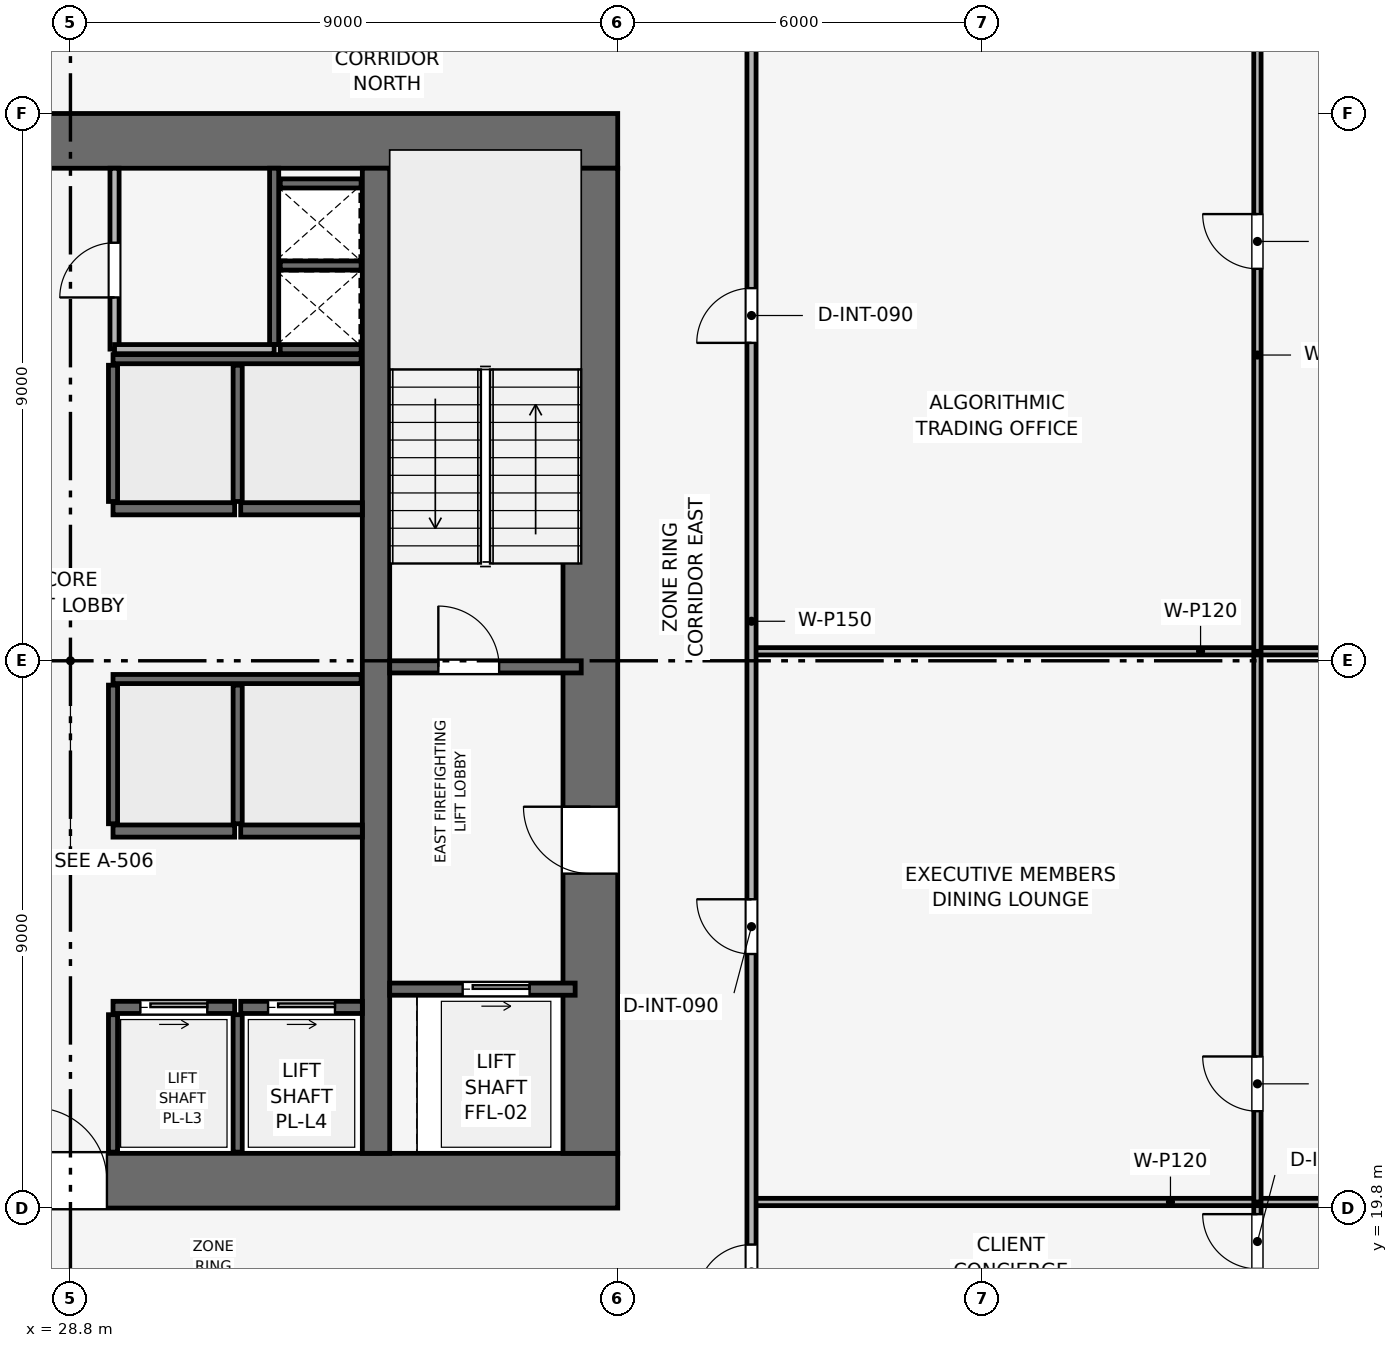
"""IFC4 building model, lengths in metres.
Left out: names, types, materials, properties, quantities, classifications, styles, units other than length and angle.
Written with IfcOpenShell. Run it as: python <this file> out.ifc"""

import sys

from ifc_helpers import new_model, si_unit, direction, frame, frame_2d, origin, place, context, subcontext, project, spatial, rectangle, extrude, element, fill, save


model = new_model("IFC4")
c1 = context("Model", 3, precision=1e-05, world=origin(), true_north=direction((0.0, 1.0)))
c2 = subcontext(c1, "Body", "Model", "MODEL_VIEW")
j1 = project(units=[si_unit("LENGTHUNIT", "METRE"), si_unit("PLANEANGLEUNIT", "RADIAN")], contexts=[c1])
p1 = place(None, origin())
s1 = spatial("IfcSite", under=j1, at=p1, CompositionType="ELEMENT")
p2 = place(p1, origin())
s2 = spatial("IfcBuilding", under=s1, at=p2, CompositionType="ELEMENT")
p3 = place(p2, frame((0.0, 0.0, 121.2)))
s3 = spatial("IfcBuildingStorey", under=s2, at=p3, CompositionType="ELEMENT", Elevation=121.2)
p4 = place(p3, frame((19.8, 20.25, 0.0), z_axis=(0.0, 0.0, 1.0), x_axis=(1.0, 0.0, 0.0)))
e1 = element("IfcWall", 1, at=p4, inside=s3, PredefinedType="SHEAR", context=c2, shape_type="SweptSolid", body=[
    extrude(rectangle(XDim=18.0, YDim=0.9, at=frame_2d((9.0, 0.0))), origin(), (0.0, 0.0, 1.0), 3.9),
])
p5 = place(p4, frame((8.4, 0.0, 0.0)))
e2 = element("IfcOpeningElement", 2, at=p5, cuts=e1, PredefinedType="OPENING", context=c2, shape_type="SweptSolid", body=[
    extrude(rectangle(XDim=1.2, YDim=2.2, at=frame_2d((0.6, 1.1))), frame((0.0, 0.46, 0.0), z_axis=(0.0, -1.0, 0.0), x_axis=(1.0, 0.0, 0.0)), (0.0, 0.0, 1.0), 0.92),
])
p6 = place(p3, frame((19.8, 37.35, 0.0), z_axis=(0.0, 0.0, 1.0), x_axis=(1.0, 0.0, 0.0)))
e3 = element("IfcWall", 3, at=p6, inside=s3, PredefinedType="SHEAR", context=c2, shape_type="SweptSolid", body=[
    extrude(rectangle(XDim=18.0, YDim=0.9, at=frame_2d((9.0, 0.0))), origin(), (0.0, 0.0, 1.0), 3.9),
])
p7 = place(p6, frame((7.05, 0.0, 0.0)))
e4 = element("IfcOpeningElement", 4, at=p7, cuts=e3, PredefinedType="OPENING", context=c2, shape_type="SweptSolid", body=[
    extrude(rectangle(XDim=1.1, YDim=2.15, at=frame_2d((0.55, 1.075))), frame((0.0, 0.46, 0.0), z_axis=(0.0, -1.0, 0.0), x_axis=(1.0, 0.0, 0.0)), (0.0, 0.0, 1.0), 0.92),
])
p8 = place(p3, frame((37.35, 20.7, 0.0), z_axis=(0.0, 0.0, 1.0), x_axis=(0.0, 1.0, 0.0)))
e5 = element("IfcWall", 5, at=p8, inside=s3, PredefinedType="SHEAR", context=c2, shape_type="SweptSolid", body=[
    extrude(rectangle(XDim=16.2, YDim=0.9, at=frame_2d((8.1, 0.0))), origin(), (0.0, 0.0, 1.0), 3.9),
])
p9 = place(p8, frame((4.6, 0.0, 0.0)))
e6 = element("IfcOpeningElement", 6, at=p9, cuts=e5, PredefinedType="OPENING", context=c2, shape_type="SweptSolid", body=[
    extrude(rectangle(XDim=1.1, YDim=2.15, at=frame_2d((0.55, 1.075))), frame((0.0, 0.46, 0.0), z_axis=(0.0, -1.0, 0.0), x_axis=(1.0, 0.0, 0.0)), (0.0, 0.0, 1.0), 0.92),
])
p10 = place(p3, frame((33.825, 20.7, 0.0), z_axis=(0.0, 0.0, 1.0), x_axis=(0.0, 1.0, 0.0)))
e7 = element("IfcWall", 7, at=p10, inside=s3, PredefinedType="SHEAR", context=c2, shape_type="SweptSolid", body=[
    extrude(rectangle(XDim=16.2, YDim=0.45, at=frame_2d((8.1, 0.0))), origin(), (0.0, 0.0, 1.0), 3.9),
])
p11 = place(p3, frame((34.05, 28.7, 0.0), z_axis=(0.0, 0.0, 1.0), x_axis=(1.0, 0.0, 0.0)))
e8 = element("IfcWall", 8, at=p11, inside=s3, PredefinedType="SHEAR", context=c2, shape_type="SweptSolid", body=[
    extrude(rectangle(XDim=3.15, YDim=0.2, at=frame_2d((1.575, 0.0))), origin(), (0.0, 0.0, 1.0), 3.65),
])
p12 = place(p11, frame((0.8, 0.0, 0.0)))
e9 = element("IfcOpeningElement", 9, at=p12, cuts=e8, PredefinedType="OPENING", context=c2, shape_type="SweptSolid", body=[
    extrude(rectangle(XDim=1.0, YDim=2.1, at=frame_2d((0.5, 1.05))), frame((0.0, 0.11, 0.0), z_axis=(0.0, -1.0, 0.0), x_axis=(1.0, 0.0, 0.0)), (0.0, 0.0, 1.0), 0.22),
])
p13 = place(p3, frame((32.15, 34.0, 0.0), z_axis=(0.0, 0.0, 1.0), x_axis=(0.0, 1.0, 0.0)))
e10 = element("IfcWall", 10, at=p13, inside=s3, PredefinedType="SHEAR", context=c2, shape_type="SweptSolid", body=[
    extrude(rectangle(XDim=2.9, YDim=0.15, at=frame_2d((1.45, 0.0))), origin(), (0.0, 0.0, 1.0), 3.65),
])
for number, where, z_axis, x_axis in (
    (11, (32.25, 33.925, 0.0), (0.0, 0.0, 1.0), (1.0, 0.0, 0.0)),
    (12, (32.25, 35.3, 0.0), (0.0, 0.0, 1.0), (1.0, 0.0, 0.0)),
):
    element("IfcWall", number, at=place(p3, frame(where, z_axis=z_axis, x_axis=x_axis)), inside=s3, PredefinedType="SHEAR", context=c2, shape_type="SweptSolid", body=[
        extrude(rectangle(XDim=1.33, YDim=0.15, at=frame_2d((0.665, 0.0))), origin(), (0.0, 0.0, 1.0), 3.65),
    ])
p14 = place(p3, frame((34.05, 23.4, 0.0), z_axis=(0.0, 0.0, 1.0), x_axis=(1.0, 0.0, 0.0)))
e13 = element("IfcWall", 13, at=p14, inside=s3, PredefinedType="SHEAR", context=c2, shape_type="SweptSolid", body=[
    extrude(rectangle(XDim=3.05, YDim=0.2, at=frame_2d((1.525, 0.0))), origin(), (0.0, 0.0, 1.0), 3.65),
])
p15 = place(p14, frame((1.2, 0.0, 0.0)))
e14 = element("IfcOpeningElement", 14, at=p15, cuts=e13, PredefinedType="OPENING", context=c2, shape_type="SweptSolid", body=[
    extrude(rectangle(XDim=1.1, YDim=2.15, at=frame_2d((0.55, 1.075))), frame((0.0, 0.11, 0.0), z_axis=(0.0, -1.0, 0.0), x_axis=(1.0, 0.0, 0.0)), (0.0, 0.0, 1.0), 0.22),
])
p16 = place(p3, frame((29.5, 23.1, 0.0), z_axis=(0.0, 0.0, 1.0), x_axis=(1.0, 0.0, 0.0)))
e15 = element("IfcWall", 15, at=p16, inside=s3, PredefinedType="SHEAR", context=c2, shape_type="SweptSolid", body=[
    extrude(rectangle(XDim=2.0, YDim=0.2, at=frame_2d((1.0, 0.0))), origin(), (0.0, 0.0, 1.0), 3.65),
])
p17 = place(p16, frame((0.45, 0.0, 0.0)))
e16 = element("IfcOpeningElement", 16, at=p17, cuts=e15, PredefinedType="OPENING", context=c2, shape_type="SweptSolid", body=[
    extrude(rectangle(XDim=1.1, YDim=2.15, at=frame_2d((0.55, 1.075))), frame((0.0, 0.11, 0.0), z_axis=(0.0, -1.0, 0.0), x_axis=(1.0, 0.0, 0.0)), (0.0, 0.0, 1.0), 0.22),
])
p18 = place(p3, frame((31.6, 23.1, 0.0), z_axis=(0.0, 0.0, 1.0), x_axis=(1.0, 0.0, 0.0)))
e17 = element("IfcWall", 17, at=p18, inside=s3, PredefinedType="SHEAR", context=c2, shape_type="SweptSolid", body=[
    extrude(rectangle(XDim=2.0, YDim=0.2, at=frame_2d((1.0, 0.0))), origin(), (0.0, 0.0, 1.0), 3.65),
])
p19 = place(p18, frame((0.45, 0.0, 0.0)))
e18 = element("IfcOpeningElement", 18, at=p19, cuts=e17, PredefinedType="OPENING", context=c2, shape_type="SweptSolid", body=[
    extrude(rectangle(XDim=1.1, YDim=2.15, at=frame_2d((0.55, 1.075))), frame((0.0, 0.11, 0.0), z_axis=(0.0, -1.0, 0.0), x_axis=(1.0, 0.0, 0.0)), (0.0, 0.0, 1.0), 0.22),
])
for number, where, z_axis, x_axis in (
    (19, (29.5, 26.0, 0.0), (0.0, 0.0, 1.0), (1.0, 0.0, 0.0)),
    (20, (31.6, 26.0, 0.0), (0.0, 0.0, 1.0), (1.0, 0.0, 0.0)),
    (21, (29.5, 31.3, 0.0), (0.0, 0.0, 1.0), (1.0, 0.0, 0.0)),
    (22, (31.6, 31.3, 0.0), (0.0, 0.0, 1.0), (1.0, 0.0, 0.0)),
):
    element("IfcWall", number, at=place(p3, frame(where, z_axis=z_axis, x_axis=x_axis)), inside=s3, PredefinedType="SHEAR", context=c2, shape_type="SweptSolid", body=[
        extrude(rectangle(XDim=2.0, YDim=0.2, at=frame_2d((1.0, 0.0))), origin(), (0.0, 0.0, 1.0), 3.65),
    ])
p20 = place(p3, frame((32.25, 36.65, 0.0), z_axis=(0.0, 0.0, 1.0), x_axis=(1.0, 0.0, 0.0)))
e23 = element("IfcWall", 23, at=p20, inside=s3, PredefinedType="SHEAR", context=c2, shape_type="SweptSolid", body=[
    extrude(rectangle(XDim=1.33, YDim=0.15, at=frame_2d((0.665, 0.0))), origin(), (0.0, 0.0, 1.0), 3.65),
])
for number, where, z_axis, x_axis in (
    (24, (29.5, 20.72, 0.0), (0.0, 0.0, 1.0), (0.0, 1.0, 0.0)),
    (25, (31.55, 20.72, 0.0), (0.0, 0.0, 1.0), (0.0, 1.0, 0.0)),
):
    element("IfcWall", number, at=place(p3, frame(where, z_axis=z_axis, x_axis=x_axis)), inside=s3, PredefinedType="SHEAR", context=c2, shape_type="SweptSolid", body=[
        extrude(rectangle(XDim=2.26, YDim=0.15, at=frame_2d((1.13, 0.0))), origin(), (0.0, 0.0, 1.0), 3.65),
    ])
p21 = place(p3, frame((29.5, 28.5, 0.0), z_axis=(0.0, 0.0, 1.0), x_axis=(1.0, 0.0, 0.0)))
e26 = element("IfcWall", 26, at=p21, inside=s3, PredefinedType="SHEAR", context=c2, shape_type="SweptSolid", body=[
    extrude(rectangle(XDim=4.08, YDim=0.15, at=frame_2d((2.04, 0.0))), origin(), (0.0, 0.0, 1.0), 3.65),
])
for number, where, z_axis, x_axis in (
    (27, (29.5, 26.12, 0.0), (0.0, 0.0, 1.0), (0.0, 1.0, 0.0)),
    (28, (31.55, 26.12, 0.0), (0.0, 0.0, 1.0), (0.0, 1.0, 0.0)),
):
    element("IfcWall", number, at=place(p3, frame(where, z_axis=z_axis, x_axis=x_axis)), inside=s3, PredefinedType="SHEAR", context=c2, shape_type="SweptSolid", body=[
        extrude(rectangle(XDim=2.28, YDim=0.15, at=frame_2d((1.14, 0.0))), origin(), (0.0, 0.0, 1.0), 3.65),
    ])
p22 = place(p3, frame((29.5, 33.76, 0.0), z_axis=(0.0, 0.0, 1.0), x_axis=(1.0, 0.0, 0.0)))
e29 = element("IfcWall", 29, at=p22, inside=s3, PredefinedType="SHEAR", context=c2, shape_type="SweptSolid", body=[
    extrude(rectangle(XDim=4.08, YDim=0.15, at=frame_2d((2.04, 0.0))), origin(), (0.0, 0.0, 1.0), 3.65),
])
for number, where, z_axis, x_axis in (
    (30, (29.5, 31.42, 0.0), (0.0, 0.0, 1.0), (0.0, 1.0, 0.0)),
    (31, (31.55, 31.42, 0.0), (0.0, 0.0, 1.0), (0.0, 1.0, 0.0)),
):
    element("IfcWall", number, at=place(p3, frame(where, z_axis=z_axis, x_axis=x_axis)), inside=s3, PredefinedType="SHEAR", context=c2, shape_type="SweptSolid", body=[
        extrude(rectangle(XDim=2.24, YDim=0.15, at=frame_2d((1.12, 0.0))), origin(), (0.0, 0.0, 1.0), 3.65),
    ])
p23 = place(p3, frame((29.525, 33.925, 0.0), z_axis=(0.0, 0.0, 1.0), x_axis=(0.0, 1.0, 0.0)))
e32 = element("IfcWall", 32, at=p23, inside=s3, PredefinedType="PARTITIONING", context=c2, shape_type="SweptSolid", body=[
    extrude(rectangle(XDim=2.975, YDim=0.15, at=frame_2d((1.487, 0.0))), origin(), (0.0, 0.0, 1.0), 3.65),
])
p24 = place(p23, frame((0.85, 0.0, 0.0)))
e33 = element("IfcOpeningElement", 33, at=p24, cuts=e32, PredefinedType="OPENING", context=c2, shape_type="SweptSolid", body=[
    extrude(rectangle(XDim=0.9, YDim=2.1, at=frame_2d((0.45, 1.05))), frame((0.0, 0.085, 0.0), z_axis=(0.0, -1.0, 0.0), x_axis=(1.0, 0.0, 0.0)), (0.0, 0.0, 1.0), 0.17),
])
p25 = place(p3, frame((29.525, 33.925, 0.0), z_axis=(0.0, 0.0, 1.0), x_axis=(1.0, 0.0, 0.0)))
e34 = element("IfcWall", 34, at=p25, inside=s3, PredefinedType="PARTITIONING", context=c2, shape_type="SweptSolid", body=[
    extrude(rectangle(XDim=2.625, YDim=0.15, at=frame_2d((1.312, 0.0))), origin(), (0.0, 0.0, 1.0), 3.65),
])
p26 = place(p3, frame((48.32, 17.6, 0.0), z_axis=(0.0, 0.0, 1.0), x_axis=(0.0, 1.0, 0.0)))
e35 = element("IfcWall", 35, at=p26, inside=s3, PredefinedType="PARTITIONING", context=c2, shape_type="SweptSolid", body=[
    extrude(rectangle(XDim=2.3, YDim=0.12, at=frame_2d((1.15, 0.0))), origin(), (0.0, 0.0, 1.0), 3.65),
])
p27 = place(p26, frame((1.2, 0.0, 0.0)))
e36 = element("IfcOpeningElement", 36, at=p27, cuts=e35, PredefinedType="OPENING", context=c2, shape_type="SweptSolid", body=[
    extrude(rectangle(XDim=0.9, YDim=2.1, at=frame_2d((0.45, 1.05))), frame((0.0, 0.07, 0.0), z_axis=(0.0, -1.0, 0.0), x_axis=(1.0, 0.0, 0.0)), (0.0, 0.0, 1.0), 0.14),
])
p28 = place(p3, frame((40.0, 19.9, 0.0), z_axis=(0.0, 0.0, 1.0), x_axis=(1.0, 0.0, 0.0)))
e37 = element("IfcWall", 37, at=p28, inside=s3, PredefinedType="PARTITIONING", context=c2, shape_type="SweptSolid", body=[
    extrude(rectangle(XDim=14.77, YDim=0.12, at=frame_2d((7.385, 0.0))), origin(), (0.0, 0.0, 1.0), 3.035),
])
p29 = place(p3, frame((48.32, 19.9, 0.0), z_axis=(0.0, 0.0, 1.0), x_axis=(0.0, 1.0, 0.0)))
e38 = element("IfcWall", 38, at=p29, inside=s3, PredefinedType="PARTITIONING", context=c2, shape_type="SweptSolid", body=[
    extrude(rectangle(XDim=9.056, YDim=0.12, at=frame_2d((4.528, 0.0))), origin(), (0.0, 0.0, 1.0), 3.185),
])
p30 = place(p29, frame((1.493, 0.0, 0.0)))
e39 = element("IfcOpeningElement", 39, at=p30, cuts=e38, PredefinedType="OPENING", context=c2, shape_type="SweptSolid", body=[
    extrude(rectangle(XDim=0.9, YDim=2.1, at=frame_2d((0.45, 1.05))), frame((0.0, 0.07, 0.0), z_axis=(0.0, -1.0, 0.0), x_axis=(1.0, 0.0, 0.0)), (0.0, 0.0, 1.0), 0.14),
])
p31 = place(p3, frame((40.0, 28.956, 0.0), z_axis=(0.0, 0.0, 1.0), x_axis=(1.0, 0.0, 0.0)))
e40 = element("IfcWall", 40, at=p31, inside=s3, PredefinedType="PARTITIONING", context=c2, shape_type="SweptSolid", body=[
    extrude(rectangle(XDim=14.77, YDim=0.12, at=frame_2d((7.385, 0.0))), origin(), (0.0, 0.0, 1.0), 3.035),
])
p32 = place(p3, frame((48.32, 28.956, 0.0), z_axis=(0.0, 0.0, 1.0), x_axis=(0.0, 1.0, 0.0)))
e41 = element("IfcWall", 41, at=p32, inside=s3, PredefinedType="PARTITIONING", context=c2, shape_type="SweptSolid", body=[
    extrude(rectangle(XDim=11.044, YDim=0.12, at=frame_2d((5.522, 0.0))), origin(), (0.0, 0.0, 1.0), 3.185),
])
p33 = place(p32, frame((6.29, 0.0, 0.0)))
e42 = element("IfcOpeningElement", 42, at=p33, cuts=e41, PredefinedType="OPENING", context=c2, shape_type="SweptSolid", body=[
    extrude(rectangle(XDim=0.9, YDim=2.1, at=frame_2d((0.45, 1.05))), frame((0.0, 0.07, 0.0), z_axis=(0.0, -1.0, 0.0), x_axis=(1.0, 0.0, 0.0)), (0.0, 0.0, 1.0), 0.14),
])
p34 = place(p3, frame((40.0, 17.6, 0.0), z_axis=(0.0, 0.0, 1.0), x_axis=(0.0, 1.0, 0.0)))
e43 = element("IfcWall", 43, at=p34, inside=s3, PredefinedType="PARTITIONING", context=c2, shape_type="SweptSolid", body=[
    extrude(rectangle(XDim=22.4, YDim=0.15, at=frame_2d((11.2, 0.0))), origin(), (0.0, 0.0, 1.0), 3.185),
])
p35 = place(p34, frame((0.7, 0.0, 0.0)))
e44 = element("IfcOpeningElement", 44, at=p35, cuts=e43, PredefinedType="OPENING", context=c2, shape_type="SweptSolid", body=[
    extrude(rectangle(XDim=0.9, YDim=2.1, at=frame_2d((0.45, 1.05))), frame((0.0, 0.085, 0.0), z_axis=(0.0, -1.0, 0.0), x_axis=(1.0, 0.0, 0.0)), (0.0, 0.0, 1.0), 0.17),
])
p36 = place(p34, frame((6.378, 0.0, 0.0)))
e45 = element("IfcOpeningElement", 45, at=p36, cuts=e43, PredefinedType="OPENING", context=c2, shape_type="SweptSolid", body=[
    extrude(rectangle(XDim=0.9, YDim=2.1, at=frame_2d((0.45, 1.05))), frame((0.0, 0.085, 0.0), z_axis=(0.0, -1.0, 0.0), x_axis=(1.0, 0.0, 0.0)), (0.0, 0.0, 1.0), 0.17),
])
p37 = place(p34, frame((16.428, 0.0, 0.0)))
e46 = element("IfcOpeningElement", 46, at=p37, cuts=e43, PredefinedType="OPENING", context=c2, shape_type="SweptSolid", body=[
    extrude(rectangle(XDim=0.9, YDim=2.1, at=frame_2d((0.45, 1.05))), frame((0.0, 0.085, 0.0), z_axis=(0.0, -1.0, 0.0), x_axis=(1.0, 0.0, 0.0)), (0.0, 0.0, 1.0), 0.17),
])
p38 = place(p12, origin())
e47 = element("IfcDoor", 47, at=p38, inside=s3, OperationType="SINGLE_SWING_LEFT", PredefinedType="DOOR", context=c2, shape_type="SweptSolid", body=[
    extrude(rectangle(XDim=1.0, YDim=2.1, at=frame_2d((0.5, 1.05))), frame((0.0, 0.025, 0.0), z_axis=(0.0, -1.0, 0.0), x_axis=(1.0, 0.0, 0.0)), (0.0, 0.0, 1.0), 0.05),
])
fill(e9, e47)
p39 = place(p15, origin())
e48 = element("IfcDoor", 48, at=p39, inside=s3, OperationType="SLIDING_TO_RIGHT", PredefinedType="DOOR", context=c2, shape_type="SweptSolid", body=[
    extrude(rectangle(XDim=1.1, YDim=2.15, at=frame_2d((0.55, 1.075))), frame((0.0, 0.025, 0.0), z_axis=(0.0, -1.0, 0.0), x_axis=(1.0, 0.0, 0.0)), (0.0, 0.0, 1.0), 0.05),
])
fill(e14, e48)
p40 = place(p17, origin())
e49 = element("IfcDoor", 49, at=p40, inside=s3, OperationType="SLIDING_TO_RIGHT", PredefinedType="DOOR", context=c2, shape_type="SweptSolid", body=[
    extrude(rectangle(XDim=1.1, YDim=2.15, at=frame_2d((0.55, 1.075))), frame((0.0, 0.025, 0.0), z_axis=(0.0, -1.0, 0.0), x_axis=(1.0, 0.0, 0.0)), (0.0, 0.0, 1.0), 0.05),
])
fill(e16, e49)
p41 = place(p19, origin())
e50 = element("IfcDoor", 50, at=p41, inside=s3, OperationType="SLIDING_TO_RIGHT", PredefinedType="DOOR", context=c2, shape_type="SweptSolid", body=[
    extrude(rectangle(XDim=1.1, YDim=2.15, at=frame_2d((0.55, 1.075))), frame((0.0, 0.025, 0.0), z_axis=(0.0, -1.0, 0.0), x_axis=(1.0, 0.0, 0.0)), (0.0, 0.0, 1.0), 0.05),
])
fill(e18, e50)
p42 = place(p24, origin())
e51 = element("IfcDoor", 51, at=p42, inside=s3, OperationType="SINGLE_SWING_LEFT", PredefinedType="DOOR", context=c2, shape_type="SweptSolid", body=[
    extrude(rectangle(XDim=0.9, YDim=2.1, at=frame_2d((0.45, 1.05))), frame((0.0, 0.025, 0.0), z_axis=(0.0, -1.0, 0.0), x_axis=(1.0, 0.0, 0.0)), (0.0, 0.0, 1.0), 0.05),
])
fill(e33, e51)
p43 = place(p27, origin())
e52 = element("IfcDoor", 52, at=p43, inside=s3, OperationType="SINGLE_SWING_RIGHT", PredefinedType="DOOR", context=c2, shape_type="SweptSolid", body=[
    extrude(rectangle(XDim=0.9, YDim=2.1, at=frame_2d((0.45, 1.05))), frame((0.0, 0.025, 0.0), z_axis=(0.0, -1.0, 0.0), x_axis=(1.0, 0.0, 0.0)), (0.0, 0.0, 1.0), 0.05),
])
fill(e36, e52)
p44 = place(p30, origin())
e53 = element("IfcDoor", 53, at=p44, inside=s3, OperationType="SINGLE_SWING_RIGHT", PredefinedType="DOOR", context=c2, shape_type="SweptSolid", body=[
    extrude(rectangle(XDim=0.9, YDim=2.1, at=frame_2d((0.45, 1.05))), frame((0.0, 0.025, 0.0), z_axis=(0.0, -1.0, 0.0), x_axis=(1.0, 0.0, 0.0)), (0.0, 0.0, 1.0), 0.05),
])
fill(e39, e53)
p45 = place(p33, origin())
e54 = element("IfcDoor", 54, at=p45, inside=s3, OperationType="SINGLE_SWING_RIGHT", PredefinedType="DOOR", context=c2, shape_type="SweptSolid", body=[
    extrude(rectangle(XDim=0.9, YDim=2.1, at=frame_2d((0.45, 1.05))), frame((0.0, 0.025, 0.0), z_axis=(0.0, -1.0, 0.0), x_axis=(1.0, 0.0, 0.0)), (0.0, 0.0, 1.0), 0.05),
])
fill(e42, e54)
p46 = place(p35, origin())
e55 = element("IfcDoor", 55, at=p46, inside=s3, OperationType="SINGLE_SWING_LEFT", PredefinedType="DOOR", context=c2, shape_type="SweptSolid", body=[
    extrude(rectangle(XDim=0.9, YDim=2.1, at=frame_2d((0.45, 1.05))), frame((0.0, 0.025, 0.0), z_axis=(0.0, -1.0, 0.0), x_axis=(1.0, 0.0, 0.0)), (0.0, 0.0, 1.0), 0.05),
])
fill(e44, e55)
p47 = place(p36, origin())
e56 = element("IfcDoor", 56, at=p47, inside=s3, OperationType="SINGLE_SWING_RIGHT", PredefinedType="DOOR", context=c2, shape_type="SweptSolid", body=[
    extrude(rectangle(XDim=0.9, YDim=2.1, at=frame_2d((0.45, 1.05))), frame((0.0, 0.025, 0.0), z_axis=(0.0, -1.0, 0.0), x_axis=(1.0, 0.0, 0.0)), (0.0, 0.0, 1.0), 0.05),
])
fill(e45, e56)
p48 = place(p37, origin())
e57 = element("IfcDoor", 57, at=p48, inside=s3, OperationType="SINGLE_SWING_LEFT", PredefinedType="DOOR", context=c2, shape_type="SweptSolid", body=[
    extrude(rectangle(XDim=0.9, YDim=2.1, at=frame_2d((0.45, 1.05))), frame((0.0, 0.025, 0.0), z_axis=(0.0, -1.0, 0.0), x_axis=(1.0, 0.0, 0.0)), (0.0, 0.0, 1.0), 0.05),
])
fill(e46, e57)
p49 = place(p9, origin())
e58 = element("IfcDoor", 58, at=p49, inside=s3, OperationType="SINGLE_SWING_RIGHT", PredefinedType="DOOR", context=c2, shape_type="SweptSolid", body=[
    extrude(rectangle(XDim=1.1, YDim=2.15, at=frame_2d((0.55, 1.075))), frame((0.0, 0.025, 0.0), z_axis=(0.0, -1.0, 0.0), x_axis=(1.0, 0.0, 0.0)), (0.0, 0.0, 1.0), 0.05),
])
fill(e6, e58)
p50 = place(p5, origin())
e59 = element("IfcDoor", 59, at=p50, inside=s3, OperationType="SINGLE_SWING_LEFT", PredefinedType="DOOR", context=c2, shape_type="SweptSolid", body=[
    extrude(rectangle(XDim=1.2, YDim=2.2, at=frame_2d((0.6, 1.1))), frame((0.0, 0.025, 0.0), z_axis=(0.0, -1.0, 0.0), x_axis=(1.0, 0.0, 0.0)), (0.0, 0.0, 1.0), 0.05),
])
fill(e2, e59)
save(model, sys.argv[1])
